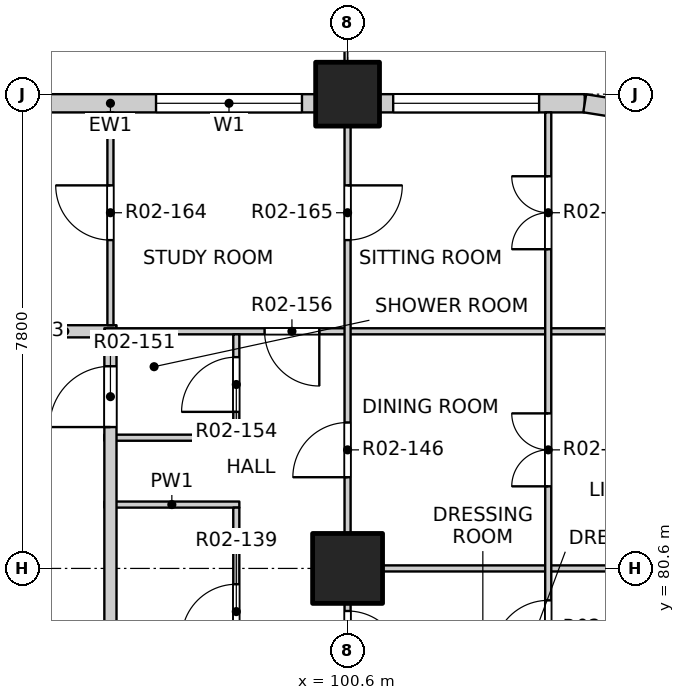
"""IFC4 building model, lengths in metres.
Left out: names, types, materials, properties, quantities, classifications, styles, units other than length and angle.
Written with IfcOpenShell. Run it as: python <this file> out.ifc"""

import sys

from ifc_helpers import new_model, si_unit, direction, frame, frame_2d, origin, origin_2d, place, context, subcontext, project, spatial, rectangle, extrude, element, fill, save


model = new_model("IFC4")
c1 = context("Model", 3, precision=1e-05, world=origin(), true_north=direction((0.0, 1.0)))
c2 = subcontext(c1, "Body", "Model", "MODEL_VIEW")
j1 = project(units=[si_unit("LENGTHUNIT", "METRE"), si_unit("PLANEANGLEUNIT", "RADIAN")], contexts=[c1])
p1 = place(None, origin())
s1 = spatial("IfcSite", under=j1, at=p1, CompositionType="ELEMENT")
p2 = place(p1, origin())
s2 = spatial("IfcBuilding", under=s1, at=p2, CompositionType="ELEMENT")
p3 = place(p2, frame((0.0, 0.0, 36.5)))
s3 = spatial("IfcBuildingStorey", under=s2, at=p3, CompositionType="ELEMENT", Elevation=36.5)
p4 = place(p3, frame((100.6, 88.4, -0.25), z_axis=(0.0, 0.0, 1.0), x_axis=(1.0, 0.0, 0.0)))
e1 = element("IfcColumn", 1, at=p4, inside=s3, PredefinedType="COLUMN", context=c2, shape_type="SweptSolid", body=[
    extrude(rectangle(XDim=1.05, YDim=1.05, at=origin_2d()), origin(), (0.0, 0.0, 1.0), 3.4),
])
p5 = place(p3, frame((100.6, 80.6, -0.25), z_axis=(0.0, 0.0, 1.0), x_axis=(1.0, 0.0, 0.0)))
e2 = element("IfcColumn", 2, at=p5, inside=s3, PredefinedType="COLUMN", context=c2, shape_type="SweptSolid", body=[
    extrude(rectangle(XDim=1.15, YDim=1.15, at=origin_2d()), origin(), (0.0, 0.0, 1.0), 3.4),
])
p6 = place(p3, frame((93.325, 88.25, 0.0), z_axis=(0.0, 0.0, 1.0), x_axis=(1.0, 0.0, 0.0)))
e3 = element("IfcWall", 3, at=p6, inside=s3, PredefinedType="SOLIDWALL", context=c2, shape_type="SweptSolid", body=[
    extrude(rectangle(XDim=6.75, YDim=0.3, at=frame_2d((3.375, 0.0))), origin(), (0.0, 0.0, 1.0), 2.7),
])
p7 = place(p6, frame((0.525, 0.0, 0.0)))
e4 = element("IfcOpeningElement", 4, at=p7, cuts=e3, PredefinedType="OPENING", context=c2, shape_type="SweptSolid", body=[
    extrude(rectangle(XDim=1.8, YDim=2.4, at=frame_2d((0.9, 1.2))), frame((0.0, 0.16, 0.0), z_axis=(0.0, -1.0, 0.0), x_axis=(1.0, 0.0, 0.0)), (0.0, 0.0, 1.0), 0.32),
])
p8 = place(p6, frame((4.125, 0.0, 0.9)))
e5 = element("IfcOpeningElement", 5, at=p8, cuts=e3, PredefinedType="OPENING", context=c2, shape_type="SweptSolid", body=[
    extrude(rectangle(XDim=2.4, YDim=1.8, at=frame_2d((1.2, 0.9))), frame((0.0, 0.16, 0.0), z_axis=(0.0, -1.0, 0.0), x_axis=(1.0, 0.0, 0.0)), (0.0, 0.0, 1.0), 0.32),
])
p9 = place(p3, frame((101.125, 88.25, 0.0), z_axis=(0.0, 0.0, 1.0), x_axis=(1.0, 0.0, 0.0)))
e6 = element("IfcWall", 6, at=p9, inside=s3, PredefinedType="SOLIDWALL", context=c2, shape_type="SweptSolid", body=[
    extrude(rectangle(XDim=3.375, YDim=0.3, at=frame_2d((1.688, 0.0))), origin(), (0.0, 0.0, 1.0), 2.7),
])
p10 = place(p9, frame((0.225, 0.0, 0.9)))
e7 = element("IfcOpeningElement", 7, at=p10, cuts=e6, PredefinedType="OPENING", context=c2, shape_type="SweptSolid", body=[
    extrude(rectangle(XDim=2.4, YDim=1.8, at=frame_2d((1.2, 0.9))), frame((0.0, 0.16, 0.0), z_axis=(0.0, -1.0, 0.0), x_axis=(1.0, 0.0, 0.0)), (0.0, 0.0, 1.0), 0.32),
])
p11 = place(p3, frame((105.659, 88.066, 0.0), z_axis=(0.0, 0.0, 1.0), x_axis=(-0.987678452879, 0.156496880861, 0.0)))
e8 = element("IfcWall", 8, at=p11, inside=s3, PredefinedType="SOLIDWALL", context=c2, shape_type="SweptSolid", body=[
    extrude(rectangle(XDim=1.173, YDim=0.3, at=frame_2d((0.586, 0.0))), origin(), (0.0, 0.0, 1.0), 2.7),
])
p12 = place(p3, frame((100.55, 80.6, 0.0), z_axis=(0.0, 0.0, 1.0), x_axis=(1.0, 0.0, 0.0)))
e9 = element("IfcWall", 9, at=p12, inside=s3, PredefinedType="PARTITIONING", context=c2, shape_type="SweptSolid", body=[
    extrude(rectangle(XDim=7.55, YDim=0.1, at=frame_2d((3.775, 0.0))), origin(), (0.0, 0.0, 1.0), 2.55),
])
for number, where, z_axis, x_axis in (
    (10, (96.6, 81.65, 0.0), (0.0, 0.0, 1.0), (1.0, 0.0, 0.0)),
    (11, (96.6, 82.75, 0.0), (0.0, 0.0, 1.0), (1.0, 0.0, 0.0)),
):
    element("IfcWall", number, at=place(p3, frame(where, z_axis=z_axis, x_axis=x_axis)), inside=s3, PredefinedType="PARTITIONING", context=c2, shape_type="SweptSolid", body=[
        extrude(rectangle(XDim=2.22, YDim=0.1, at=frame_2d((1.11, 0.0))), origin(), (0.0, 0.0, 1.0), 3.15),
    ])
p13 = place(p3, frame((95.1, 84.5, 0.0), z_axis=(0.0, 0.0, 1.0), x_axis=(1.0, 0.0, 0.0)))
e12 = element("IfcWall", 12, at=p13, inside=s3, PredefinedType="PARTITIONING", context=c2, shape_type="SweptSolid", body=[
    extrude(rectangle(XDim=1.7, YDim=0.2, at=frame_2d((0.85, 0.0))), origin(), (0.0, 0.0, 1.0), 3.15),
])
p14 = place(p3, frame((96.6, 84.5, 0.0), z_axis=(0.0, 0.0, 1.0), x_axis=(1.0, 0.0, 0.0)))
e13 = element("IfcWall", 13, at=p14, inside=s3, PredefinedType="PARTITIONING", context=c2, shape_type="SweptSolid", body=[
    extrude(rectangle(XDim=11.5, YDim=0.1, at=frame_2d((5.75, 0.0))), origin(), (0.0, 0.0, 1.0), 3.15),
])
p15 = place(p14, frame((2.635, 0.0, 0.0)))
e14 = element("IfcOpeningElement", 14, at=p15, cuts=e13, PredefinedType="OPENING", context=c2, shape_type="SweptSolid", body=[
    extrude(rectangle(XDim=0.9, YDim=2.1, at=frame_2d((0.45, 1.05))), frame((0.0, 0.06, 0.0), z_axis=(0.0, -1.0, 0.0), x_axis=(1.0, 0.0, 0.0)), (0.0, 0.0, 1.0), 0.12),
])
p16 = place(p3, frame((96.7, 53.4, 0.0), z_axis=(0.0, 0.0, 1.0), x_axis=(0.0, 1.0, 0.0)))
e15 = element("IfcWall", 15, at=p16, inside=s3, PredefinedType="PARTITIONING", context=c2, shape_type="SweptSolid", body=[
    extrude(rectangle(XDim=31.0, YDim=0.2, at=frame_2d((15.5, 0.0))), origin(), (0.0, 0.0, 1.0), 3.15),
])
p17 = place(p16, frame((2.425, 0.0, 0.0)))
e16 = element("IfcOpeningElement", 16, at=p17, cuts=e15, PredefinedType="OPENING", context=c2, shape_type="SweptSolid", body=[
    extrude(rectangle(XDim=1.0, YDim=2.1, at=frame_2d((0.5, 1.05))), frame((0.0, 0.11, 0.0), z_axis=(0.0, -1.0, 0.0), x_axis=(1.0, 0.0, 0.0)), (0.0, 0.0, 1.0), 0.22),
])
p18 = place(p16, frame((13.375, 0.0, 0.0)))
e17 = element("IfcOpeningElement", 17, at=p18, cuts=e15, PredefinedType="OPENING", context=c2, shape_type="SweptSolid", body=[
    extrude(rectangle(XDim=1.0, YDim=2.1, at=frame_2d((0.5, 1.05))), frame((0.0, 0.11, 0.0), z_axis=(0.0, -1.0, 0.0), x_axis=(1.0, 0.0, 0.0)), (0.0, 0.0, 1.0), 0.22),
])
p19 = place(p16, frame((29.525, 0.0, 0.0)))
e18 = element("IfcOpeningElement", 18, at=p19, cuts=e15, PredefinedType="OPENING", context=c2, shape_type="SweptSolid", body=[
    extrude(rectangle(XDim=1.0, YDim=2.1, at=frame_2d((0.5, 1.05))), frame((0.0, 0.11, 0.0), z_axis=(0.0, -1.0, 0.0), x_axis=(1.0, 0.0, 0.0)), (0.0, 0.0, 1.0), 0.22),
])
p20 = place(p3, frame((96.7, 84.6, 0.0), z_axis=(0.0, 0.0, 1.0), x_axis=(0.0, 1.0, 0.0)))
e19 = element("IfcWall", 19, at=p20, inside=s3, PredefinedType="PARTITIONING", context=c2, shape_type="SweptSolid", body=[
    extrude(rectangle(XDim=3.5, YDim=0.1, at=frame_2d((1.75, 0.0))), origin(), (0.0, 0.0, 1.0), 3.15),
])
p21 = place(p20, frame((1.4, 0.0, 0.0)))
e20 = element("IfcOpeningElement", 20, at=p21, cuts=e19, PredefinedType="OPENING", context=c2, shape_type="SweptSolid", body=[
    extrude(rectangle(XDim=0.9, YDim=2.1, at=frame_2d((0.45, 1.05))), frame((0.0, 0.06, 0.0), z_axis=(0.0, -1.0, 0.0), x_axis=(1.0, 0.0, 0.0)), (0.0, 0.0, 1.0), 0.12),
])
p22 = place(p3, frame((98.77, 66.65, 0.0), z_axis=(0.0, 0.0, 1.0), x_axis=(0.0, 1.0, 0.0)))
e21 = element("IfcWall", 21, at=p22, inside=s3, PredefinedType="PARTITIONING", context=c2, shape_type="SweptSolid", body=[
    extrude(rectangle(XDim=14.95, YDim=0.1, at=frame_2d((7.475, 0.0))), origin(), (0.0, 0.0, 1.0), 3.15),
])
p23 = place(p22, frame((0.925, 0.0, 0.0)))
e22 = element("IfcOpeningElement", 22, at=p23, cuts=e21, PredefinedType="OPENING", context=c2, shape_type="SweptSolid", body=[
    extrude(rectangle(XDim=0.8, YDim=2.1, at=frame_2d((0.4, 1.05))), frame((0.0, 0.06, 0.0), z_axis=(0.0, -1.0, 0.0), x_axis=(1.0, 0.0, 0.0)), (0.0, 0.0, 1.0), 0.12),
])
p24 = place(p22, frame((3.975, 0.0, 0.0)))
e23 = element("IfcOpeningElement", 23, at=p24, cuts=e21, PredefinedType="OPENING", context=c2, shape_type="SweptSolid", body=[
    extrude(rectangle(XDim=0.9, YDim=2.1, at=frame_2d((0.45, 1.05))), frame((0.0, 0.06, 0.0), z_axis=(0.0, -1.0, 0.0), x_axis=(1.0, 0.0, 0.0)), (0.0, 0.0, 1.0), 0.12),
])
p25 = place(p22, frame((6.915, 0.0, 0.0)))
e24 = element("IfcOpeningElement", 24, at=p25, cuts=e21, PredefinedType="OPENING", context=c2, shape_type="SweptSolid", body=[
    extrude(rectangle(XDim=0.9, YDim=2.1, at=frame_2d((0.45, 1.05))), frame((0.0, 0.06, 0.0), z_axis=(0.0, -1.0, 0.0), x_axis=(1.0, 0.0, 0.0)), (0.0, 0.0, 1.0), 0.12),
])
p26 = place(p22, frame((9.63, 0.0, 0.0)))
e25 = element("IfcOpeningElement", 25, at=p26, cuts=e21, PredefinedType="OPENING", context=c2, shape_type="SweptSolid", body=[
    extrude(rectangle(XDim=0.8, YDim=2.1, at=frame_2d((0.4, 1.05))), frame((0.0, 0.06, 0.0), z_axis=(0.0, -1.0, 0.0), x_axis=(1.0, 0.0, 0.0)), (0.0, 0.0, 1.0), 0.12),
])
p27 = place(p22, frame((12.79, 0.0, 0.0)))
e26 = element("IfcOpeningElement", 26, at=p27, cuts=e21, PredefinedType="OPENING", context=c2, shape_type="SweptSolid", body=[
    extrude(rectangle(XDim=0.9, YDim=2.1, at=frame_2d((0.45, 1.05))), frame((0.0, 0.06, 0.0), z_axis=(0.0, -1.0, 0.0), x_axis=(1.0, 0.0, 0.0)), (0.0, 0.0, 1.0), 0.12),
])
p28 = place(p3, frame((98.77, 82.8, 0.0), z_axis=(0.0, 0.0, 1.0), x_axis=(0.0, 1.0, 0.0)))
e27 = element("IfcWall", 27, at=p28, inside=s3, PredefinedType="PARTITIONING", context=c2, shape_type="SweptSolid", body=[
    extrude(rectangle(XDim=1.65, YDim=0.1, at=frame_2d((0.825, 0.0))), origin(), (0.0, 0.0, 1.0), 3.15),
])
p29 = place(p28, frame((0.375, 0.0, 0.0)))
e28 = element("IfcOpeningElement", 28, at=p29, cuts=e27, PredefinedType="OPENING", context=c2, shape_type="SweptSolid", body=[
    extrude(rectangle(XDim=0.9, YDim=2.1, at=frame_2d((0.45, 1.05))), frame((0.0, 0.06, 0.0), z_axis=(0.0, -1.0, 0.0), x_axis=(1.0, 0.0, 0.0)), (0.0, 0.0, 1.0), 0.12),
])
p30 = place(p3, frame((100.6, 49.4, 0.0), z_axis=(0.0, 0.0, 1.0), x_axis=(0.0, 1.0, 0.0)))
e29 = element("IfcWall", 29, at=p30, inside=s3, PredefinedType="PARTITIONING", context=c2, shape_type="SweptSolid", body=[
    extrude(rectangle(XDim=31.2, YDim=0.1, at=frame_2d((15.6, 0.0))), origin(), (0.0, 0.0, 1.0), 3.15),
])
p31 = place(p30, frame((2.475, 0.0, 0.0)))
e30 = element("IfcOpeningElement", 30, at=p31, cuts=e29, PredefinedType="OPENING", context=c2, shape_type="SweptSolid", body=[
    extrude(rectangle(XDim=0.9, YDim=2.1, at=frame_2d((0.45, 1.05))), frame((0.0, 0.06, 0.0), z_axis=(0.0, -1.0, 0.0), x_axis=(1.0, 0.0, 0.0)), (0.0, 0.0, 1.0), 0.12),
])
p32 = place(p30, frame((5.4, 0.0, 0.0)))
e31 = element("IfcOpeningElement", 31, at=p32, cuts=e29, PredefinedType="OPENING", context=c2, shape_type="SweptSolid", body=[
    extrude(rectangle(XDim=0.9, YDim=2.1, at=frame_2d((0.45, 1.05))), frame((0.0, 0.06, 0.0), z_axis=(0.0, -1.0, 0.0), x_axis=(1.0, 0.0, 0.0)), (0.0, 0.0, 1.0), 0.12),
])
p33 = place(p30, frame((10.275, 0.0, 0.0)))
e32 = element("IfcOpeningElement", 32, at=p33, cuts=e29, PredefinedType="OPENING", context=c2, shape_type="SweptSolid", body=[
    extrude(rectangle(XDim=0.9, YDim=2.1, at=frame_2d((0.45, 1.05))), frame((0.0, 0.06, 0.0), z_axis=(0.0, -1.0, 0.0), x_axis=(1.0, 0.0, 0.0)), (0.0, 0.0, 1.0), 0.12),
])
p34 = place(p30, frame((14.0, 0.0, 0.0)))
e33 = element("IfcOpeningElement", 33, at=p34, cuts=e29, PredefinedType="OPENING", context=c2, shape_type="SweptSolid", body=[
    extrude(rectangle(XDim=0.9, YDim=2.1, at=frame_2d((0.45, 1.05))), frame((0.0, 0.06, 0.0), z_axis=(0.0, -1.0, 0.0), x_axis=(1.0, 0.0, 0.0)), (0.0, 0.0, 1.0), 0.12),
])
p35 = place(p30, frame((17.1, 0.0, 0.0)))
e34 = element("IfcOpeningElement", 34, at=p35, cuts=e29, PredefinedType="OPENING", context=c2, shape_type="SweptSolid", body=[
    extrude(rectangle(XDim=0.9, YDim=2.1, at=frame_2d((0.45, 1.05))), frame((0.0, 0.06, 0.0), z_axis=(0.0, -1.0, 0.0), x_axis=(1.0, 0.0, 0.0)), (0.0, 0.0, 1.0), 0.12),
])
p36 = place(p30, frame((21.0, 0.0, 0.0)))
e35 = element("IfcOpeningElement", 35, at=p36, cuts=e29, PredefinedType="OPENING", context=c2, shape_type="SweptSolid", body=[
    extrude(rectangle(XDim=0.9, YDim=2.1, at=frame_2d((0.45, 1.05))), frame((0.0, 0.06, 0.0), z_axis=(0.0, -1.0, 0.0), x_axis=(1.0, 0.0, 0.0)), (0.0, 0.0, 1.0), 0.12),
])
p37 = place(p30, frame((25.875, 0.0, 0.0)))
e36 = element("IfcOpeningElement", 36, at=p37, cuts=e29, PredefinedType="OPENING", context=c2, shape_type="SweptSolid", body=[
    extrude(rectangle(XDim=0.9, YDim=2.1, at=frame_2d((0.45, 1.05))), frame((0.0, 0.06, 0.0), z_axis=(0.0, -1.0, 0.0), x_axis=(1.0, 0.0, 0.0)), (0.0, 0.0, 1.0), 0.12),
])
p38 = place(p30, frame((29.6, 0.0, 0.0)))
e37 = element("IfcOpeningElement", 37, at=p38, cuts=e29, PredefinedType="OPENING", context=c2, shape_type="SweptSolid", body=[
    extrude(rectangle(XDim=0.9, YDim=2.1, at=frame_2d((0.45, 1.05))), frame((0.0, 0.06, 0.0), z_axis=(0.0, -1.0, 0.0), x_axis=(1.0, 0.0, 0.0)), (0.0, 0.0, 1.0), 0.12),
])
p39 = place(p3, frame((100.6, 80.6, 0.0), z_axis=(0.0, 0.0, 1.0), x_axis=(0.0, 1.0, 0.0)))
e38 = element("IfcWall", 38, at=p39, inside=s3, PredefinedType="PARTITIONING", context=c2, shape_type="SweptSolid", body=[
    extrude(rectangle(XDim=7.5, YDim=0.1, at=frame_2d((3.75, 0.0))), origin(), (0.0, 0.0, 1.0), 2.55),
])
p40 = place(p39, frame((1.5, 0.0, 0.0)))
e39 = element("IfcOpeningElement", 39, at=p40, cuts=e38, PredefinedType="OPENING", context=c2, shape_type="SweptSolid", body=[
    extrude(rectangle(XDim=0.9, YDim=2.1, at=frame_2d((0.45, 1.05))), frame((0.0, 0.06, 0.0), z_axis=(0.0, -1.0, 0.0), x_axis=(1.0, 0.0, 0.0)), (0.0, 0.0, 1.0), 0.12),
])
p41 = place(p39, frame((5.4, 0.0, 0.0)))
e40 = element("IfcOpeningElement", 40, at=p41, cuts=e38, PredefinedType="OPENING", context=c2, shape_type="SweptSolid", body=[
    extrude(rectangle(XDim=0.9, YDim=2.1, at=frame_2d((0.45, 1.05))), frame((0.0, 0.06, 0.0), z_axis=(0.0, -1.0, 0.0), x_axis=(1.0, 0.0, 0.0)), (0.0, 0.0, 1.0), 0.12),
])
p42 = place(p3, frame((103.9, 72.9, 0.0), z_axis=(0.0, 0.0, 1.0), x_axis=(0.0, 1.0, 0.0)))
e41 = element("IfcWall", 41, at=p42, inside=s3, PredefinedType="PARTITIONING", context=c2, shape_type="SweptSolid", body=[
    extrude(rectangle(XDim=15.2, YDim=0.1, at=frame_2d((7.6, 0.0))), origin(), (0.0, 0.0, 1.0), 3.15),
])
p43 = place(p42, frame((0.425, 0.0, 0.0)))
e42 = element("IfcOpeningElement", 42, at=p43, cuts=e41, PredefinedType="OPENING", context=c2, shape_type="SweptSolid", body=[
    extrude(rectangle(XDim=0.9, YDim=2.1, at=frame_2d((0.45, 1.05))), frame((0.0, 0.06, 0.0), z_axis=(0.0, -1.0, 0.0), x_axis=(1.0, 0.0, 0.0)), (0.0, 0.0, 1.0), 0.12),
])
p44 = place(p42, frame((2.375, 0.0, 0.0)))
e43 = element("IfcOpeningElement", 43, at=p44, cuts=e41, PredefinedType="OPENING", context=c2, shape_type="SweptSolid", body=[
    extrude(rectangle(XDim=0.9, YDim=2.1, at=frame_2d((0.45, 1.05))), frame((0.0, 0.06, 0.0), z_axis=(0.0, -1.0, 0.0), x_axis=(1.0, 0.0, 0.0)), (0.0, 0.0, 1.0), 0.12),
])
p45 = place(p42, frame((4.325, 0.0, 0.0)))
e44 = element("IfcOpeningElement", 44, at=p45, cuts=e41, PredefinedType="OPENING", context=c2, shape_type="SweptSolid", body=[
    extrude(rectangle(XDim=0.9, YDim=2.1, at=frame_2d((0.45, 1.05))), frame((0.0, 0.06, 0.0), z_axis=(0.0, -1.0, 0.0), x_axis=(1.0, 0.0, 0.0)), (0.0, 0.0, 1.0), 0.12),
])
p46 = place(p42, frame((6.275, 0.0, 0.0)))
e45 = element("IfcOpeningElement", 45, at=p46, cuts=e41, PredefinedType="OPENING", context=c2, shape_type="SweptSolid", body=[
    extrude(rectangle(XDim=0.9, YDim=2.1, at=frame_2d((0.45, 1.05))), frame((0.0, 0.06, 0.0), z_axis=(0.0, -1.0, 0.0), x_axis=(1.0, 0.0, 0.0)), (0.0, 0.0, 1.0), 0.12),
])
p47 = place(p42, frame((9.05, 0.0, 0.0)))
e46 = element("IfcOpeningElement", 46, at=p47, cuts=e41, PredefinedType="OPENING", context=c2, shape_type="SweptSolid", body=[
    extrude(rectangle(XDim=1.2, YDim=2.1, at=frame_2d((0.6, 1.05))), frame((0.0, 0.06, 0.0), z_axis=(0.0, -1.0, 0.0), x_axis=(1.0, 0.0, 0.0)), (0.0, 0.0, 1.0), 0.12),
])
p48 = place(p42, frame((12.95, 0.0, 0.0)))
e47 = element("IfcOpeningElement", 47, at=p48, cuts=e41, PredefinedType="OPENING", context=c2, shape_type="SweptSolid", body=[
    extrude(rectangle(XDim=1.2, YDim=2.1, at=frame_2d((0.6, 1.05))), frame((0.0, 0.06, 0.0), z_axis=(0.0, -1.0, 0.0), x_axis=(1.0, 0.0, 0.0)), (0.0, 0.0, 1.0), 0.12),
])
p49 = place(p8, origin())
e48 = element("IfcWindow", 48, at=p49, inside=s3, PartitioningType="DOUBLE_PANEL_VERTICAL", PredefinedType="WINDOW", context=c2, shape_type="SweptSolid", body=[
    extrude(rectangle(XDim=2.4, YDim=1.8, at=frame_2d((1.2, 0.9))), frame((0.0, 0.03, 0.0), z_axis=(0.0, -1.0, 0.0), x_axis=(1.0, 0.0, 0.0)), (0.0, 0.0, 1.0), 0.06),
])
fill(e5, e48)
p50 = place(p10, origin())
e49 = element("IfcWindow", 49, at=p50, inside=s3, PartitioningType="DOUBLE_PANEL_VERTICAL", PredefinedType="WINDOW", context=c2, shape_type="SweptSolid", body=[
    extrude(rectangle(XDim=2.4, YDim=1.8, at=frame_2d((1.2, 0.9))), frame((0.0, 0.03, 0.0), z_axis=(0.0, -1.0, 0.0), x_axis=(1.0, 0.0, 0.0)), (0.0, 0.0, 1.0), 0.06),
])
fill(e7, e49)
p51 = place(p38, origin())
e50 = element("IfcDoor", 50, at=p51, inside=s3, OperationType="SINGLE_SWING_RIGHT", PredefinedType="DOOR", context=c2, shape_type="SweptSolid", body=[
    extrude(rectangle(XDim=0.9, YDim=2.1, at=frame_2d((0.45, 1.05))), frame((0.0, 0.025, 0.0), z_axis=(0.0, -1.0, 0.0), x_axis=(1.0, 0.0, 0.0)), (0.0, 0.0, 1.0), 0.05),
])
fill(e37, e50)
p52 = place(p46, origin())
e51 = element("IfcDoor", 51, at=p52, inside=s3, OperationType="SINGLE_SWING_LEFT", PredefinedType="DOOR", context=c2, shape_type="SweptSolid", body=[
    extrude(rectangle(XDim=0.9, YDim=2.1, at=frame_2d((0.45, 1.05))), frame((0.0, 0.025, 0.0), z_axis=(0.0, -1.0, 0.0), x_axis=(1.0, 0.0, 0.0)), (0.0, 0.0, 1.0), 0.05),
])
fill(e45, e51)
p53 = place(p27, origin())
e52 = element("IfcDoor", 52, at=p53, inside=s3, OperationType="SINGLE_SWING_LEFT", PredefinedType="DOOR", context=c2, shape_type="SweptSolid", body=[
    extrude(rectangle(XDim=0.9, YDim=2.1, at=frame_2d((0.45, 1.05))), frame((0.0, 0.025, 0.0), z_axis=(0.0, -1.0, 0.0), x_axis=(1.0, 0.0, 0.0)), (0.0, 0.0, 1.0), 0.05),
])
fill(e26, e52)
p54 = place(p40, origin())
e53 = element("IfcDoor", 53, at=p54, inside=s3, OperationType="SINGLE_SWING_LEFT", PredefinedType="DOOR", context=c2, shape_type="SweptSolid", body=[
    extrude(rectangle(XDim=0.9, YDim=2.1, at=frame_2d((0.45, 1.05))), frame((0.0, 0.025, 0.0), z_axis=(0.0, -1.0, 0.0), x_axis=(1.0, 0.0, 0.0)), (0.0, 0.0, 1.0), 0.05),
])
fill(e39, e53)
p55 = place(p47, origin())
e54 = element("IfcDoor", 54, at=p55, inside=s3, OperationType="DOUBLE_DOOR_SINGLE_SWING", PredefinedType="DOOR", context=c2, shape_type="SweptSolid", body=[
    extrude(rectangle(XDim=1.2, YDim=2.1, at=frame_2d((0.6, 1.05))), frame((0.0, 0.025, 0.0), z_axis=(0.0, -1.0, 0.0), x_axis=(1.0, 0.0, 0.0)), (0.0, 0.0, 1.0), 0.05),
])
fill(e46, e54)
p56 = place(p19, origin())
e55 = element("IfcDoor", 55, at=p56, inside=s3, OperationType="SINGLE_SWING_LEFT", PredefinedType="DOOR", context=c2, shape_type="SweptSolid", body=[
    extrude(rectangle(XDim=1.0, YDim=2.1, at=frame_2d((0.5, 1.05))), frame((0.0, 0.025, 0.0), z_axis=(0.0, -1.0, 0.0), x_axis=(1.0, 0.0, 0.0)), (0.0, 0.0, 1.0), 0.05),
])
fill(e18, e55)
p57 = place(p29, origin())
e56 = element("IfcDoor", 56, at=p57, inside=s3, OperationType="SINGLE_SWING_LEFT", PredefinedType="DOOR", context=c2, shape_type="SweptSolid", body=[
    extrude(rectangle(XDim=0.9, YDim=2.1, at=frame_2d((0.45, 1.05))), frame((0.0, 0.025, 0.0), z_axis=(0.0, -1.0, 0.0), x_axis=(1.0, 0.0, 0.0)), (0.0, 0.0, 1.0), 0.05),
])
fill(e28, e56)
p58 = place(p15, origin())
e57 = element("IfcDoor", 57, at=p58, inside=s3, OperationType="SINGLE_SWING_LEFT", PredefinedType="DOOR", context=c2, shape_type="SweptSolid", body=[
    extrude(rectangle(XDim=0.9, YDim=2.1, at=frame_2d((0.45, 1.05))), frame((0.0, 0.025, 0.0), z_axis=(0.0, -1.0, 0.0), x_axis=(1.0, 0.0, 0.0)), (0.0, 0.0, 1.0), 0.05),
])
fill(e14, e57)
p59 = place(p21, origin())
e58 = element("IfcDoor", 58, at=p59, inside=s3, OperationType="SINGLE_SWING_RIGHT", PredefinedType="DOOR", context=c2, shape_type="SweptSolid", body=[
    extrude(rectangle(XDim=0.9, YDim=2.1, at=frame_2d((0.45, 1.05))), frame((0.0, 0.025, 0.0), z_axis=(0.0, -1.0, 0.0), x_axis=(1.0, 0.0, 0.0)), (0.0, 0.0, 1.0), 0.05),
])
fill(e20, e58)
p60 = place(p41, origin())
e59 = element("IfcDoor", 59, at=p60, inside=s3, OperationType="SINGLE_SWING_LEFT", PredefinedType="DOOR", context=c2, shape_type="SweptSolid", body=[
    extrude(rectangle(XDim=0.9, YDim=2.1, at=frame_2d((0.45, 1.05))), frame((0.0, 0.025, 0.0), z_axis=(0.0, -1.0, 0.0), x_axis=(1.0, 0.0, 0.0)), (0.0, 0.0, 1.0), 0.05),
])
fill(e40, e59)
p61 = place(p48, origin())
e60 = element("IfcDoor", 60, at=p61, inside=s3, OperationType="DOUBLE_DOOR_SINGLE_SWING", PredefinedType="DOOR", context=c2, shape_type="SweptSolid", body=[
    extrude(rectangle(XDim=1.2, YDim=2.1, at=frame_2d((0.6, 1.05))), frame((0.0, 0.025, 0.0), z_axis=(0.0, -1.0, 0.0), x_axis=(1.0, 0.0, 0.0)), (0.0, 0.0, 1.0), 0.05),
])
fill(e47, e60)
save(model, sys.argv[1])
